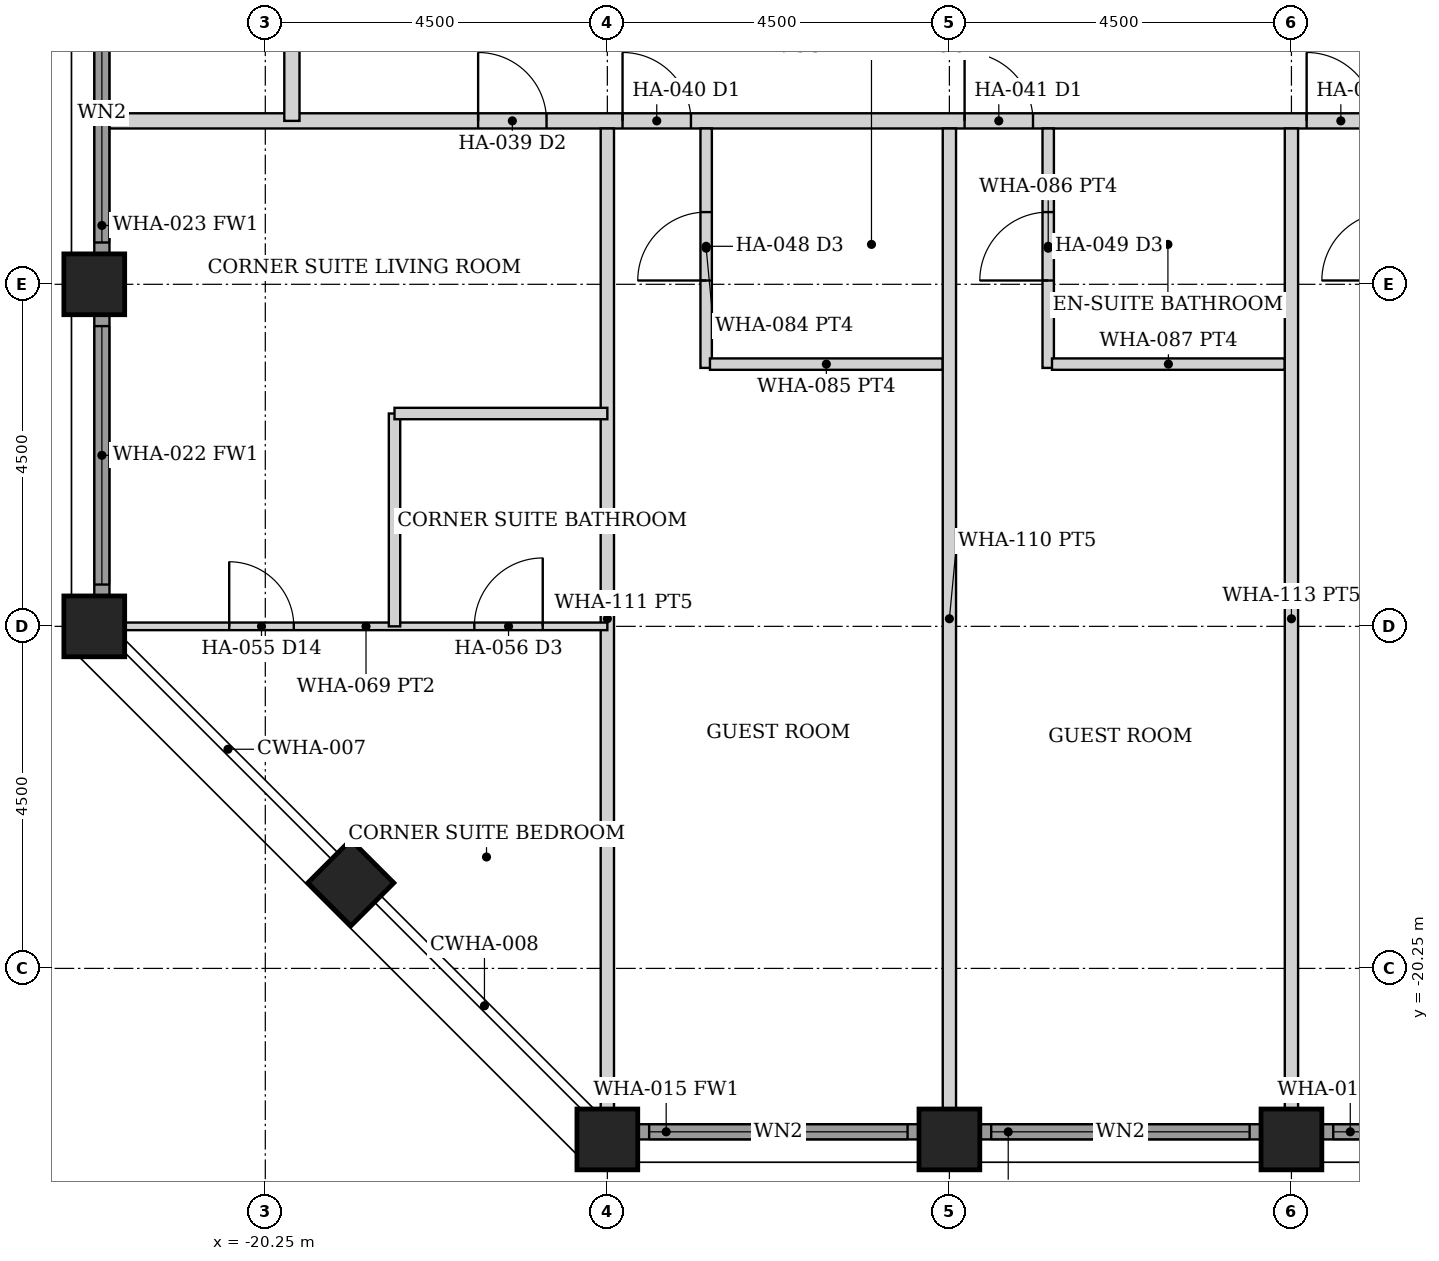
"""IFC4 building model, lengths in metres.
Left out: names, types, materials, properties, quantities, classifications, styles, units other than length and angle.
Written with IfcOpenShell. Run it as: python <this file> out.ifc"""

import sys

from ifc_helpers import new_model, si_unit, direction, frame, frame_2d, origin, origin_2d, place, context, subcontext, project, spatial, rectangle, hollow_rectangle, extrude, element, fill, save


model = new_model("IFC4")
c1 = context("Model", 3, precision=1e-05, world=origin(), true_north=direction((0.0, 1.0)))
c2 = subcontext(c1, "Body", "Model", "MODEL_VIEW")
j1 = project(units=[si_unit("LENGTHUNIT", "METRE"), si_unit("PLANEANGLEUNIT", "RADIAN")], contexts=[c1])
p1 = place(None, origin())
s1 = spatial("IfcSite", under=j1, at=p1, CompositionType="ELEMENT")
p2 = place(p1, origin())
s2 = spatial("IfcBuilding", under=s1, at=p2, CompositionType="ELEMENT")
p3 = place(p2, frame((0.0, 0.0, 118.4)))
s3 = spatial("IfcBuildingStorey", under=s2, at=p3, CompositionType="ELEMENT", Elevation=118.4)
for number, where, z_axis, x_axis in (
    (1, (-15.75, -22.5, 0.0), (0.0, 0.0, 1.0), (0.0, 1.0, 0.0)),
    (2, (-22.5, -15.75, 0.0), (0.0, 0.0, 1.0), (1.0, 0.0, 0.0)),
    (3, (-11.25, -22.5, 0.0), (0.0, 0.0, 1.0), (0.0, 1.0, 0.0)),
    (4, (-22.5, -11.25, 0.0), (0.0, 0.0, 1.0), (1.0, 0.0, 0.0)),
    (5, (-6.75, -22.5, 0.0), (0.0, 0.0, 1.0), (0.0, 1.0, 0.0)),
    (6, (-19.125, -19.125, 0.0), (0.0, 0.0, 1.0), (0.707, 0.707, 0.0)),
):
    element("IfcColumn", number, at=place(p3, frame(where, z_axis=z_axis, x_axis=x_axis)), inside=s3, PredefinedType="COLUMN", context=c2, shape_type="SweptSolid", body=[
        extrude(hollow_rectangle(XDim=0.8, YDim=0.8, WallThickness=0.06, at=origin_2d()), origin(), (0.0, 0.0, 1.0), 3.6),
    ])
p4 = place(p3, frame((-15.345, -22.4, 0.0), z_axis=(0.0, 0.0, 1.0), x_axis=(1.0, 0.0, 0.0)))
e7 = element("IfcWall", 7, at=p4, inside=s3, PredefinedType="SOLIDWALL", context=c2, shape_type="SweptSolid", body=[
    extrude(rectangle(XDim=3.69, YDim=0.2, at=frame_2d((1.845, 0.0))), origin(), (0.0, 0.0, 1.0), 2.479),
])
p5 = place(p4, frame((0.145, 0.0, 0.3)))
e8 = element("IfcOpeningElement", 8, at=p5, cuts=e7, PredefinedType="OPENING", context=c2, shape_type="SweptSolid", body=[
    extrude(rectangle(XDim=3.4, YDim=2.029, at=frame_2d((1.7, 1.015))), frame((0.0, 0.11, 0.0), z_axis=(0.0, -1.0, 0.0), x_axis=(1.0, 0.0, 0.0)), (0.0, 0.0, 1.0), 0.22),
])
p6 = place(p3, frame((-10.845, -22.4, 0.0), z_axis=(0.0, 0.0, 1.0), x_axis=(1.0, 0.0, 0.0)))
e9 = element("IfcWall", 9, at=p6, inside=s3, PredefinedType="SOLIDWALL", context=c2, shape_type="SweptSolid", body=[
    extrude(rectangle(XDim=3.69, YDim=0.2, at=frame_2d((1.845, 0.0))), origin(), (0.0, 0.0, 1.0), 2.479),
])
p7 = place(p6, frame((0.145, 0.0, 0.3)))
e10 = element("IfcOpeningElement", 10, at=p7, cuts=e9, PredefinedType="OPENING", context=c2, shape_type="SweptSolid", body=[
    extrude(rectangle(XDim=3.4, YDim=2.029, at=frame_2d((1.7, 1.015))), frame((0.0, 0.11, 0.0), z_axis=(0.0, -1.0, 0.0), x_axis=(1.0, 0.0, 0.0)), (0.0, 0.0, 1.0), 0.22),
])
p8 = place(p3, frame((-6.345, -22.4, 0.0), z_axis=(0.0, 0.0, 1.0), x_axis=(1.0, 0.0, 0.0)))
e11 = element("IfcWall", 11, at=p8, inside=s3, PredefinedType="SOLIDWALL", context=c2, shape_type="SweptSolid", body=[
    extrude(rectangle(XDim=3.69, YDim=0.2, at=frame_2d((1.845, 0.0))), origin(), (0.0, 0.0, 1.0), 2.479),
])
p9 = place(p8, frame((0.145, 0.0, 0.3)))
e12 = element("IfcOpeningElement", 12, at=p9, cuts=e11, PredefinedType="OPENING", context=c2, shape_type="SweptSolid", body=[
    extrude(rectangle(XDim=3.4, YDim=2.029, at=frame_2d((1.7, 1.015))), frame((0.0, 0.11, 0.0), z_axis=(0.0, -1.0, 0.0), x_axis=(1.0, 0.0, 0.0)), (0.0, 0.0, 1.0), 0.22),
])
p10 = place(p3, frame((-22.4, -15.345, 0.0), z_axis=(0.0, 0.0, 1.0), x_axis=(0.0, 1.0, 0.0)))
e13 = element("IfcWall", 13, at=p10, inside=s3, PredefinedType="SOLIDWALL", context=c2, shape_type="SweptSolid", body=[
    extrude(rectangle(XDim=3.69, YDim=0.2, at=frame_2d((1.845, 0.0))), origin(), (0.0, 0.0, 1.0), 2.479),
])
p11 = place(p10, frame((0.145, 0.0, 0.3)))
e14 = element("IfcOpeningElement", 14, at=p11, cuts=e13, PredefinedType="OPENING", context=c2, shape_type="SweptSolid", body=[
    extrude(rectangle(XDim=3.4, YDim=2.029, at=frame_2d((1.7, 1.015))), frame((0.0, 0.11, 0.0), z_axis=(0.0, -1.0, 0.0), x_axis=(1.0, 0.0, 0.0)), (0.0, 0.0, 1.0), 0.22),
])
p12 = place(p3, frame((-22.4, -10.845, 0.0), z_axis=(0.0, 0.0, 1.0), x_axis=(0.0, 1.0, 0.0)))
e15 = element("IfcWall", 15, at=p12, inside=s3, PredefinedType="SOLIDWALL", context=c2, shape_type="SweptSolid", body=[
    extrude(rectangle(XDim=3.69, YDim=0.2, at=frame_2d((1.845, 0.0))), origin(), (0.0, 0.0, 1.0), 2.479),
])
p13 = place(p12, frame((0.145, 0.0, 0.3)))
e16 = element("IfcOpeningElement", 16, at=p13, cuts=e15, PredefinedType="OPENING", context=c2, shape_type="SweptSolid", body=[
    extrude(rectangle(XDim=3.4, YDim=2.029, at=frame_2d((1.7, 1.015))), frame((0.0, 0.11, 0.0), z_axis=(0.0, -1.0, 0.0), x_axis=(1.0, 0.0, 0.0)), (0.0, 0.0, 1.0), 0.22),
])
p14 = place(p3, frame((-22.3, -9.1, 0.0), z_axis=(0.0, 0.0, 1.0), x_axis=(1.0, 0.0, 0.0)))
e17 = element("IfcWall", 17, at=p14, inside=s3, PredefinedType="PARTITIONING", context=c2, shape_type="SweptSolid", body=[
    extrude(rectangle(XDim=44.6, YDim=0.2, at=frame_2d((22.3, 0.0))), origin(), (0.0, 0.0, 1.0), 2.473),
])
p15 = place(p14, frame((6.75, 0.0, 0.0)))
e18 = element("IfcOpeningElement", 18, at=p15, cuts=e17, PredefinedType="OPENING", context=c2, shape_type="SweptSolid", body=[
    extrude(rectangle(XDim=0.9, YDim=2.1, at=frame_2d((0.45, 1.05))), frame((0.0, 0.11, 0.0), z_axis=(0.0, -1.0, 0.0), x_axis=(1.0, 0.0, 0.0)), (0.0, 0.0, 1.0), 0.22),
])
p16 = place(p14, frame((11.25, 0.0, 0.0)))
e19 = element("IfcOpeningElement", 19, at=p16, cuts=e17, PredefinedType="OPENING", context=c2, shape_type="SweptSolid", body=[
    extrude(rectangle(XDim=0.9, YDim=2.1, at=frame_2d((0.45, 1.05))), frame((0.0, 0.11, 0.0), z_axis=(0.0, -1.0, 0.0), x_axis=(1.0, 0.0, 0.0)), (0.0, 0.0, 1.0), 0.22),
])
p17 = place(p14, frame((15.75, 0.0, 0.0)))
e20 = element("IfcOpeningElement", 20, at=p17, cuts=e17, PredefinedType="OPENING", context=c2, shape_type="SweptSolid", body=[
    extrude(rectangle(XDim=0.9, YDim=2.1, at=frame_2d((0.45, 1.05))), frame((0.0, 0.11, 0.0), z_axis=(0.0, -1.0, 0.0), x_axis=(1.0, 0.0, 0.0)), (0.0, 0.0, 1.0), 0.22),
])
p18 = place(p14, frame((20.25, 0.0, 0.0)))
e21 = element("IfcOpeningElement", 21, at=p18, cuts=e17, PredefinedType="OPENING", context=c2, shape_type="SweptSolid", body=[
    extrude(rectangle(XDim=0.9, YDim=2.1, at=frame_2d((0.45, 1.05))), frame((0.0, 0.11, 0.0), z_axis=(0.0, -1.0, 0.0), x_axis=(1.0, 0.0, 0.0)), (0.0, 0.0, 1.0), 0.22),
])
p19 = place(p14, frame((24.75, 0.0, 0.0)))
e22 = element("IfcOpeningElement", 22, at=p19, cuts=e17, PredefinedType="OPENING", context=c2, shape_type="SweptSolid", body=[
    extrude(rectangle(XDim=0.9, YDim=2.1, at=frame_2d((0.45, 1.05))), frame((0.0, 0.11, 0.0), z_axis=(0.0, -1.0, 0.0), x_axis=(1.0, 0.0, 0.0)), (0.0, 0.0, 1.0), 0.22),
])
p20 = place(p14, frame((29.25, 0.0, 0.0)))
e23 = element("IfcOpeningElement", 23, at=p20, cuts=e17, PredefinedType="OPENING", context=c2, shape_type="SweptSolid", body=[
    extrude(rectangle(XDim=0.9, YDim=2.1, at=frame_2d((0.45, 1.05))), frame((0.0, 0.11, 0.0), z_axis=(0.0, -1.0, 0.0), x_axis=(1.0, 0.0, 0.0)), (0.0, 0.0, 1.0), 0.22),
])
p21 = place(p14, frame((33.75, 0.0, 0.0)))
e24 = element("IfcOpeningElement", 24, at=p21, cuts=e17, PredefinedType="OPENING", context=c2, shape_type="SweptSolid", body=[
    extrude(rectangle(XDim=0.9, YDim=2.1, at=frame_2d((0.45, 1.05))), frame((0.0, 0.11, 0.0), z_axis=(0.0, -1.0, 0.0), x_axis=(1.0, 0.0, 0.0)), (0.0, 0.0, 1.0), 0.22),
])
p22 = place(p14, frame((38.85, 0.0, 0.0)))
e25 = element("IfcOpeningElement", 25, at=p22, cuts=e17, PredefinedType="OPENING", context=c2, shape_type="SweptSolid", body=[
    extrude(rectangle(XDim=0.9, YDim=2.1, at=frame_2d((0.45, 1.05))), frame((0.0, 0.11, 0.0), z_axis=(0.0, -1.0, 0.0), x_axis=(1.0, 0.0, 0.0)), (0.0, 0.0, 1.0), 0.22),
])
p23 = place(p14, frame((4.85, 0.0, 0.0)))
e26 = element("IfcOpeningElement", 26, at=p23, cuts=e17, PredefinedType="OPENING", context=c2, shape_type="SweptSolid", body=[
    extrude(rectangle(XDim=0.9, YDim=2.1, at=frame_2d((0.45, 1.05))), frame((0.0, 0.11, 0.0), z_axis=(0.0, -1.0, 0.0), x_axis=(1.0, 0.0, 0.0)), (0.0, 0.0, 1.0), 0.22),
])
p24 = place(p3, frame((-19.9, -9.1, 0.0), z_axis=(0.0, 0.0, 1.0), x_axis=(0.0, 1.0, 0.0)))
e27 = element("IfcWall", 27, at=p24, inside=s3, PredefinedType="PARTITIONING", context=c2, shape_type="SweptSolid", body=[
    extrude(rectangle(XDim=18.2, YDim=0.2, at=frame_2d((9.1, 0.0))), origin(), (0.0, 0.0, 1.0), 2.473),
])
p25 = place(p24, frame((8.6, 0.0, 0.0)))
e28 = element("IfcOpeningElement", 28, at=p25, cuts=e27, PredefinedType="OPENING", context=c2, shape_type="SweptSolid", body=[
    extrude(rectangle(XDim=1.0, YDim=2.1, at=frame_2d((0.5, 1.05))), frame((0.0, 0.11, 0.0), z_axis=(0.0, -1.0, 0.0), x_axis=(1.0, 0.0, 0.0)), (0.0, 0.0, 1.0), 0.22),
])
p26 = place(p3, frame((-14.45, -12.35, 0.0), z_axis=(0.0, 0.0, 1.0), x_axis=(0.0, 1.0, 0.0)))
e29 = element("IfcWall", 29, at=p26, inside=s3, PredefinedType="PARTITIONING", context=c2, shape_type="SweptSolid", body=[
    extrude(rectangle(XDim=3.15, YDim=0.15, at=frame_2d((1.575, 0.0))), origin(), (0.0, 0.0, 1.0), 2.473),
])
p27 = place(p26, frame((1.15, 0.0, 0.0)))
e30 = element("IfcOpeningElement", 30, at=p27, cuts=e29, PredefinedType="OPENING", context=c2, shape_type="SweptSolid", body=[
    extrude(rectangle(XDim=0.9, YDim=2.1, at=frame_2d((0.45, 1.05))), frame((0.0, 0.085, 0.0), z_axis=(0.0, -1.0, 0.0), x_axis=(1.0, 0.0, 0.0)), (0.0, 0.0, 1.0), 0.17),
])
p28 = place(p3, frame((-14.4, -12.3, 0.0), z_axis=(0.0, 0.0, 1.0), x_axis=(1.0, 0.0, 0.0)))
e31 = element("IfcWall", 31, at=p28, inside=s3, PredefinedType="PARTITIONING", context=c2, shape_type="SweptSolid", body=[
    extrude(rectangle(XDim=3.062, YDim=0.15, at=frame_2d((1.531, 0.0))), origin(), (0.0, 0.0, 1.0), 2.473),
])
p29 = place(p3, frame((-9.95, -12.35, 0.0), z_axis=(0.0, 0.0, 1.0), x_axis=(0.0, 1.0, 0.0)))
e32 = element("IfcWall", 32, at=p29, inside=s3, PredefinedType="PARTITIONING", context=c2, shape_type="SweptSolid", body=[
    extrude(rectangle(XDim=3.15, YDim=0.15, at=frame_2d((1.575, 0.0))), origin(), (0.0, 0.0, 1.0), 2.473),
])
p30 = place(p29, frame((1.15, 0.0, 0.0)))
e33 = element("IfcOpeningElement", 33, at=p30, cuts=e32, PredefinedType="OPENING", context=c2, shape_type="SweptSolid", body=[
    extrude(rectangle(XDim=0.9, YDim=2.1, at=frame_2d((0.45, 1.05))), frame((0.0, 0.085, 0.0), z_axis=(0.0, -1.0, 0.0), x_axis=(1.0, 0.0, 0.0)), (0.0, 0.0, 1.0), 0.17),
])
p31 = place(p3, frame((-9.9, -12.3, 0.0), z_axis=(0.0, 0.0, 1.0), x_axis=(1.0, 0.0, 0.0)))
e34 = element("IfcWall", 34, at=p31, inside=s3, PredefinedType="PARTITIONING", context=c2, shape_type="SweptSolid", body=[
    extrude(rectangle(XDim=3.062, YDim=0.15, at=frame_2d((1.531, 0.0))), origin(), (0.0, 0.0, 1.0), 2.473),
])
for number, where, z_axis, x_axis in (
    (35, (-15.75, -22.1, 0.0), (0.0, 0.0, 1.0), (0.0, 1.0, 0.0)),
    (36, (-11.25, -22.1, 0.0), (0.0, 0.0, 1.0), (0.0, 1.0, 0.0)),
    (37, (-6.75, -22.1, 0.0), (0.0, 0.0, 1.0), (0.0, 1.0, 0.0)),
):
    element("IfcWall", number, at=place(p3, frame(where, z_axis=z_axis, x_axis=x_axis)), inside=s3, PredefinedType="PARTITIONING", context=c2, shape_type="SweptSolid", body=[
        extrude(rectangle(XDim=12.9, YDim=0.175, at=frame_2d((6.45, 0.0))), origin(), (0.0, 0.0, 1.0), 2.473),
    ])
p32 = place(p3, frame((-22.1, -15.75, 0.0), z_axis=(0.0, 0.0, 1.0), x_axis=(1.0, 0.0, 0.0)))
e38 = element("IfcWall", 38, at=p32, inside=s3, PredefinedType="PARTITIONING", context=c2, shape_type="SweptSolid", body=[
    extrude(rectangle(XDim=6.35, YDim=0.1, at=frame_2d((3.175, 0.0))), origin(), (0.0, 0.0, 1.0), 2.473),
])
p33 = place(p32, frame((1.375, 0.0, 0.0)))
e39 = element("IfcOpeningElement", 39, at=p33, cuts=e38, PredefinedType="OPENING", context=c2, shape_type="SweptSolid", body=[
    extrude(rectangle(XDim=0.85, YDim=2.1, at=frame_2d((0.425, 1.05))), frame((0.0, 0.06, 0.0), z_axis=(0.0, -1.0, 0.0), x_axis=(1.0, 0.0, 0.0)), (0.0, 0.0, 1.0), 0.12),
])
p34 = place(p32, frame((4.6, 0.0, 0.0)))
e40 = element("IfcOpeningElement", 40, at=p34, cuts=e38, PredefinedType="OPENING", context=c2, shape_type="SweptSolid", body=[
    extrude(rectangle(XDim=0.9, YDim=2.1, at=frame_2d((0.45, 1.05))), frame((0.0, 0.06, 0.0), z_axis=(0.0, -1.0, 0.0), x_axis=(1.0, 0.0, 0.0)), (0.0, 0.0, 1.0), 0.12),
])
for number, where, z_axis, x_axis in (
    (41, (-18.55, -15.75, 0.0), (0.0, 0.0, 1.0), (0.0, 1.0, 0.0)),
    (42, (-18.55, -12.95, 0.0), (0.0, 0.0, 1.0), (1.0, 0.0, 0.0)),
):
    element("IfcWall", number, at=place(p3, frame(where, z_axis=z_axis, x_axis=x_axis)), inside=s3, PredefinedType="PARTITIONING", context=c2, shape_type="SweptSolid", body=[
        extrude(rectangle(XDim=2.8, YDim=0.15, at=frame_2d((1.4, 0.0))), origin(), (0.0, 0.0, 1.0), 2.473),
    ])
p35 = place(p5, origin())
e43 = element("IfcWindow", 43, at=p35, inside=s3, PartitioningType="SINGLE_PANEL", PredefinedType="WINDOW", context=c2, shape_type="SweptSolid", body=[
    extrude(rectangle(XDim=3.4, YDim=2.029, at=frame_2d((1.7, 1.015))), frame((0.0, 0.03, 0.0), z_axis=(0.0, -1.0, 0.0), x_axis=(1.0, 0.0, 0.0)), (0.0, 0.0, 1.0), 0.06),
])
fill(e8, e43)
p36 = place(p7, origin())
e44 = element("IfcWindow", 44, at=p36, inside=s3, PartitioningType="SINGLE_PANEL", PredefinedType="WINDOW", context=c2, shape_type="SweptSolid", body=[
    extrude(rectangle(XDim=3.4, YDim=2.029, at=frame_2d((1.7, 1.015))), frame((0.0, 0.03, 0.0), z_axis=(0.0, -1.0, 0.0), x_axis=(1.0, 0.0, 0.0)), (0.0, 0.0, 1.0), 0.06),
])
fill(e10, e44)
p37 = place(p9, origin())
e45 = element("IfcWindow", 45, at=p37, inside=s3, PartitioningType="SINGLE_PANEL", PredefinedType="WINDOW", context=c2, shape_type="SweptSolid", body=[
    extrude(rectangle(XDim=3.4, YDim=2.029, at=frame_2d((1.7, 1.015))), frame((0.0, 0.03, 0.0), z_axis=(0.0, -1.0, 0.0), x_axis=(1.0, 0.0, 0.0)), (0.0, 0.0, 1.0), 0.06),
])
fill(e12, e45)
p38 = place(p11, origin())
e46 = element("IfcWindow", 46, at=p38, inside=s3, PartitioningType="SINGLE_PANEL", PredefinedType="WINDOW", context=c2, shape_type="SweptSolid", body=[
    extrude(rectangle(XDim=3.4, YDim=2.029, at=frame_2d((1.7, 1.015))), frame((0.0, 0.03, 0.0), z_axis=(0.0, -1.0, 0.0), x_axis=(1.0, 0.0, 0.0)), (0.0, 0.0, 1.0), 0.06),
])
fill(e14, e46)
p39 = place(p13, origin())
e47 = element("IfcWindow", 47, at=p39, inside=s3, PartitioningType="SINGLE_PANEL", PredefinedType="WINDOW", context=c2, shape_type="SweptSolid", body=[
    extrude(rectangle(XDim=3.4, YDim=2.029, at=frame_2d((1.7, 1.015))), frame((0.0, 0.03, 0.0), z_axis=(0.0, -1.0, 0.0), x_axis=(1.0, 0.0, 0.0)), (0.0, 0.0, 1.0), 0.06),
])
fill(e16, e47)
p40 = place(p15, origin())
e48 = element("IfcDoor", 48, at=p40, inside=s3, OperationType="SINGLE_SWING_LEFT", PredefinedType="DOOR", context=c2, shape_type="SweptSolid", body=[
    extrude(rectangle(XDim=0.9, YDim=2.1, at=frame_2d((0.45, 1.05))), frame((0.0, 0.025, 0.0), z_axis=(0.0, -1.0, 0.0), x_axis=(1.0, 0.0, 0.0)), (0.0, 0.0, 1.0), 0.05),
])
fill(e18, e48)
p41 = place(p27, origin())
e49 = element("IfcDoor", 49, at=p41, inside=s3, OperationType="SINGLE_SWING_LEFT", PredefinedType="DOOR", context=c2, shape_type="SweptSolid", body=[
    extrude(rectangle(XDim=0.9, YDim=2.1, at=frame_2d((0.45, 1.05))), frame((0.0, 0.025, 0.0), z_axis=(0.0, -1.0, 0.0), x_axis=(1.0, 0.0, 0.0)), (0.0, 0.0, 1.0), 0.05),
])
fill(e30, e49)
p42 = place(p16, origin())
e50 = element("IfcDoor", 50, at=p42, inside=s3, OperationType="SINGLE_SWING_LEFT", PredefinedType="DOOR", context=c2, shape_type="SweptSolid", body=[
    extrude(rectangle(XDim=0.9, YDim=2.1, at=frame_2d((0.45, 1.05))), frame((0.0, 0.025, 0.0), z_axis=(0.0, -1.0, 0.0), x_axis=(1.0, 0.0, 0.0)), (0.0, 0.0, 1.0), 0.05),
])
fill(e19, e50)
p43 = place(p30, origin())
e51 = element("IfcDoor", 51, at=p43, inside=s3, OperationType="SINGLE_SWING_LEFT", PredefinedType="DOOR", context=c2, shape_type="SweptSolid", body=[
    extrude(rectangle(XDim=0.9, YDim=2.1, at=frame_2d((0.45, 1.05))), frame((0.0, 0.025, 0.0), z_axis=(0.0, -1.0, 0.0), x_axis=(1.0, 0.0, 0.0)), (0.0, 0.0, 1.0), 0.05),
])
fill(e33, e51)
p44 = place(p17, origin())
e52 = element("IfcDoor", 52, at=p44, inside=s3, OperationType="SINGLE_SWING_LEFT", PredefinedType="DOOR", context=c2, shape_type="SweptSolid", body=[
    extrude(rectangle(XDim=0.9, YDim=2.1, at=frame_2d((0.45, 1.05))), frame((0.0, 0.025, 0.0), z_axis=(0.0, -1.0, 0.0), x_axis=(1.0, 0.0, 0.0)), (0.0, 0.0, 1.0), 0.05),
])
fill(e20, e52)
p45 = place(p23, origin())
e53 = element("IfcDoor", 53, at=p45, inside=s3, OperationType="SINGLE_SWING_LEFT", PredefinedType="DOOR", context=c2, shape_type="SweptSolid", body=[
    extrude(rectangle(XDim=0.9, YDim=2.1, at=frame_2d((0.45, 1.05))), frame((0.0, 0.025, 0.0), z_axis=(0.0, -1.0, 0.0), x_axis=(1.0, 0.0, 0.0)), (0.0, 0.0, 1.0), 0.05),
])
fill(e26, e53)
p46 = place(p33, origin())
e54 = element("IfcDoor", 54, at=p46, inside=s3, OperationType="SINGLE_SWING_LEFT", PredefinedType="DOOR", context=c2, shape_type="SweptSolid", body=[
    extrude(rectangle(XDim=0.85, YDim=2.1, at=frame_2d((0.425, 1.05))), frame((0.0, 0.025, 0.0), z_axis=(0.0, -1.0, 0.0), x_axis=(1.0, 0.0, 0.0)), (0.0, 0.0, 1.0), 0.05),
])
fill(e39, e54)
p47 = place(p34, origin())
e55 = element("IfcDoor", 55, at=p47, inside=s3, OperationType="SINGLE_SWING_RIGHT", PredefinedType="DOOR", context=c2, shape_type="SweptSolid", body=[
    extrude(rectangle(XDim=0.9, YDim=2.1, at=frame_2d((0.45, 1.05))), frame((0.0, 0.025, 0.0), z_axis=(0.0, -1.0, 0.0), x_axis=(1.0, 0.0, 0.0)), (0.0, 0.0, 1.0), 0.05),
])
fill(e40, e55)
save(model, sys.argv[1])
